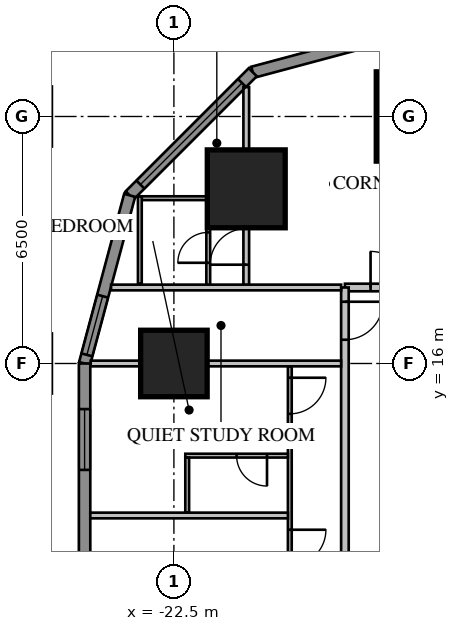
"""IFC4 building model, lengths in metres.
Left out: names, types, materials, properties, quantities, classifications, styles, units other than length and angle.
Written with IfcOpenShell. Run it as: python <this file> out.ifc"""

import sys

from ifc_helpers import new_model, si_unit, direction, frame, frame_2d, origin, origin_2d, place, context, subcontext, project, spatial, rectangle, extrude, element, fill, save


model = new_model("IFC4")
c1 = context("Model", 3, precision=1e-05, world=origin(), true_north=direction((0.0, 1.0)))
c2 = subcontext(c1, "Body", "Model", "MODEL_VIEW")
j1 = project(units=[si_unit("LENGTHUNIT", "METRE"), si_unit("PLANEANGLEUNIT", "RADIAN")], contexts=[c1])
p1 = place(None, origin())
s1 = spatial("IfcSite", under=j1, at=p1, CompositionType="ELEMENT")
p2 = place(p1, origin())
s2 = spatial("IfcBuilding", under=s1, at=p2, CompositionType="ELEMENT")
p3 = place(p2, frame((0.0, 0.0, 27.55)))
s3 = spatial("IfcBuildingStorey", under=s2, at=p3, CompositionType="ELEMENT", Elevation=27.55)
p4 = place(p3, frame((-16.0, 22.5, 0.0), z_axis=(0.0, 0.0, 1.0), x_axis=(1.0, 0.0, 0.0)))
e1 = element("IfcColumn", 1, at=p4, inside=s3, PredefinedType="COLUMN", context=c2, shape_type="SweptSolid", body=[
    extrude(rectangle(XDim=2.35, YDim=2.35, at=origin_2d()), origin(), (0.0, 0.0, 1.0), 3.85),
])
p5 = place(p3, frame((-20.596, 20.596, 0.0), z_axis=(0.0, 0.0, 1.0), x_axis=(1.0, 0.0, 0.0)))
e2 = element("IfcColumn", 2, at=p5, inside=s3, PredefinedType="COLUMN", context=c2, shape_type="SweptSolid", body=[
    extrude(rectangle(XDim=2.05, YDim=2.05, at=origin_2d()), origin(), (0.0, 0.0, 1.0), 3.85),
])
p6 = place(p3, frame((-22.5, 16.0, 0.0), z_axis=(0.0, 0.0, 1.0), x_axis=(1.0, 0.0, 0.0)))
e3 = element("IfcColumn", 3, at=p6, inside=s3, PredefinedType="COLUMN", context=c2, shape_type="SweptSolid", body=[
    extrude(rectangle(XDim=1.75, YDim=1.75, at=origin_2d()), origin(), (0.0, 0.0, 1.0), 3.85),
])
p7 = place(p3, frame((-16.0, 24.85, 0.0), z_axis=(0.0, 0.0, 1.0), x_axis=(-0.965920218567, -0.258839972501, 0.0)))
e4 = element("IfcWall", 4, at=p7, inside=s3, PredefinedType="SOLIDWALL", context=c2, shape_type="SweptSolid", body=[
    extrude(rectangle(XDim=4.581, YDim=0.3, at=frame_2d((2.291, 0.0))), origin(), (0.0, 0.0, 1.0), 3.65),
])
p8 = place(p3, frame((-20.425, 23.664, 0.0), z_axis=(0.0, 0.0, 1.0), x_axis=(-0.707106781187, -0.707106781187, 0.0)))
e5 = element("IfcWall", 5, at=p8, inside=s3, PredefinedType="SOLIDWALL", context=c2, shape_type="SweptSolid", body=[
    extrude(rectangle(XDim=4.581, YDim=0.3, at=frame_2d((2.291, 0.0))), origin(), (0.0, 0.0, 1.0), 3.65),
])
p9 = place(p8, frame((0.4, 0.0, 0.75)))
e6 = element("IfcOpeningElement", 6, at=p9, cuts=e5, PredefinedType="OPENING", context=c2, shape_type="SweptSolid", body=[
    extrude(rectangle(XDim=3.781, YDim=1.8, at=frame_2d((1.891, 0.9))), frame((0.0, 0.17, 0.0), z_axis=(0.0, -1.0, 0.0), x_axis=(1.0, 0.0, 0.0)), (0.0, 0.0, 1.0), 0.34),
])
p10 = place(p3, frame((-23.664, 20.425, 0.0), z_axis=(0.0, 0.0, 1.0), x_axis=(-0.258839972501, -0.965920218567, 0.0)))
e7 = element("IfcWall", 7, at=p10, inside=s3, PredefinedType="SOLIDWALL", context=c2, shape_type="SweptSolid", body=[
    extrude(rectangle(XDim=4.581, YDim=0.3, at=frame_2d((2.291, 0.0))), origin(), (0.0, 0.0, 1.0), 3.65),
])
p11 = place(p10, frame((2.746, 0.0, 0.75)))
e8 = element("IfcOpeningElement", 8, at=p11, cuts=e7, PredefinedType="OPENING", context=c2, shape_type="SweptSolid", body=[
    extrude(rectangle(XDim=1.6, YDim=1.8, at=frame_2d((0.8, 0.9))), frame((0.0, 0.17, 0.0), z_axis=(0.0, -1.0, 0.0), x_axis=(1.0, 0.0, 0.0)), (0.0, 0.0, 1.0), 0.34),
])
p12 = place(p3, frame((-24.85, 16.0, 0.0), z_axis=(0.0, 0.0, 1.0), x_axis=(0.0, -1.0, 0.0)))
e9 = element("IfcWall", 9, at=p12, inside=s3, PredefinedType="SOLIDWALL", context=c2, shape_type="SweptSolid", body=[
    extrude(rectangle(XDim=32.0, YDim=0.3, at=frame_2d((16.0, 0.0))), origin(), (0.0, 0.0, 1.0), 3.65),
])
p13 = place(p12, frame((1.2, 0.0, 0.75)))
e10 = element("IfcOpeningElement", 10, at=p13, cuts=e9, PredefinedType="OPENING", context=c2, shape_type="SweptSolid", body=[
    extrude(rectangle(XDim=1.6, YDim=1.8, at=frame_2d((0.8, 0.9))), frame((0.0, 0.17, 0.0), z_axis=(0.0, -1.0, 0.0), x_axis=(1.0, 0.0, 0.0)), (0.0, 0.0, 1.0), 0.34),
])
p14 = place(p12, frame((5.2, 0.0, 0.75)))
e11 = element("IfcOpeningElement", 11, at=p14, cuts=e9, PredefinedType="OPENING", context=c2, shape_type="SweptSolid", body=[
    extrude(rectangle(XDim=1.6, YDim=1.8, at=frame_2d((0.8, 0.9))), frame((0.0, 0.17, 0.0), z_axis=(0.0, -1.0, 0.0), x_axis=(1.0, 0.0, 0.0)), (0.0, 0.0, 1.0), 0.34),
])
p15 = place(p12, frame((17.2, 0.0, 0.75)))
e12 = element("IfcOpeningElement", 12, at=p15, cuts=e9, PredefinedType="OPENING", context=c2, shape_type="SweptSolid", body=[
    extrude(rectangle(XDim=1.6, YDim=1.8, at=frame_2d((0.8, 0.9))), frame((0.0, 0.17, 0.0), z_axis=(0.0, -1.0, 0.0), x_axis=(1.0, 0.0, 0.0)), (0.0, 0.0, 1.0), 0.34),
])
p16 = place(p12, frame((21.2, 0.0, 0.75)))
e13 = element("IfcOpeningElement", 13, at=p16, cuts=e9, PredefinedType="OPENING", context=c2, shape_type="SweptSolid", body=[
    extrude(rectangle(XDim=1.6, YDim=1.8, at=frame_2d((0.8, 0.9))), frame((0.0, 0.17, 0.0), z_axis=(0.0, -1.0, 0.0), x_axis=(1.0, 0.0, 0.0)), (0.0, 0.0, 1.0), 0.34),
])
p17 = place(p12, frame((25.2, 0.0, 0.75)))
e14 = element("IfcOpeningElement", 14, at=p17, cuts=e9, PredefinedType="OPENING", context=c2, shape_type="SweptSolid", body=[
    extrude(rectangle(XDim=1.6, YDim=1.8, at=frame_2d((0.8, 0.9))), frame((0.0, 0.17, 0.0), z_axis=(0.0, -1.0, 0.0), x_axis=(1.0, 0.0, 0.0)), (0.0, 0.0, 1.0), 0.34),
])
p18 = place(p12, frame((29.2, 0.0, 0.75)))
e15 = element("IfcOpeningElement", 15, at=p18, cuts=e9, PredefinedType="OPENING", context=c2, shape_type="SweptSolid", body=[
    extrude(rectangle(XDim=1.6, YDim=1.8, at=frame_2d((0.8, 0.9))), frame((0.0, 0.17, 0.0), z_axis=(0.0, -1.0, 0.0), x_axis=(1.0, 0.0, 0.0)), (0.0, 0.0, 1.0), 0.34),
])
p19 = place(p12, frame((8.8, 0.0, 0.75)))
e16 = element("IfcOpeningElement", 16, at=p19, cuts=e9, PredefinedType="OPENING", context=c2, shape_type="SweptSolid", body=[
    extrude(rectangle(XDim=2.4, YDim=1.8, at=frame_2d((1.2, 0.9))), frame((0.0, 0.17, 0.0), z_axis=(0.0, -1.0, 0.0), x_axis=(1.0, 0.0, 0.0)), (0.0, 0.0, 1.0), 0.34),
])
p20 = place(p12, frame((13.812, 0.0, 0.0)))
e17 = element("IfcOpeningElement", 17, at=p20, cuts=e9, PredefinedType="OPENING", context=c2, shape_type="SweptSolid", body=[
    extrude(rectangle(XDim=1.0, YDim=2.4, at=frame_2d((0.5, 1.2))), frame((0.0, 0.17, 0.0), z_axis=(0.0, -1.0, 0.0), x_axis=(1.0, 0.0, 0.0)), (0.0, 0.0, 1.0), 0.34),
])
p21 = place(p3, frame((18.0, 18.0, 0.0), z_axis=(0.0, 0.0, 1.0), x_axis=(-1.0, 0.0, 0.0)))
e18 = element("IfcWall", 18, at=p21, inside=s3, PredefinedType="PARTITIONING", context=c2, shape_type="SweptSolid", body=[
    extrude(rectangle(XDim=36.0, YDim=0.2, at=frame_2d((18.0, 0.0))), origin(), (0.0, 0.0, 1.0), 3.65),
])
p22 = place(p21, frame((0.375, 0.0, 0.0)))
e19 = element("IfcOpeningElement", 19, at=p22, cuts=e18, PredefinedType="OPENING", context=c2, shape_type="SweptSolid", body=[
    extrude(rectangle(XDim=1.0, YDim=2.1, at=frame_2d((0.5, 1.05))), frame((0.0, 0.12, 0.0), z_axis=(0.0, -1.0, 0.0), x_axis=(1.0, 0.0, 0.0)), (0.0, 0.0, 1.0), 0.24),
])
p23 = place(p21, frame((3.8, 0.0, 0.0)))
e20 = element("IfcOpeningElement", 20, at=p23, cuts=e18, PredefinedType="OPENING", context=c2, shape_type="SweptSolid", body=[
    extrude(rectangle(XDim=0.95, YDim=2.1, at=frame_2d((0.475, 1.05))), frame((0.0, 0.12, 0.0), z_axis=(0.0, -1.0, 0.0), x_axis=(1.0, 0.0, 0.0)), (0.0, 0.0, 1.0), 0.24),
])
p24 = place(p21, frame((7.8, 0.0, 0.0)))
e21 = element("IfcOpeningElement", 21, at=p24, cuts=e18, PredefinedType="OPENING", context=c2, shape_type="SweptSolid", body=[
    extrude(rectangle(XDim=0.95, YDim=2.1, at=frame_2d((0.475, 1.05))), frame((0.0, 0.12, 0.0), z_axis=(0.0, -1.0, 0.0), x_axis=(1.0, 0.0, 0.0)), (0.0, 0.0, 1.0), 0.24),
])
p25 = place(p21, frame((19.8, 0.0, 0.0)))
e22 = element("IfcOpeningElement", 22, at=p25, cuts=e18, PredefinedType="OPENING", context=c2, shape_type="SweptSolid", body=[
    extrude(rectangle(XDim=0.95, YDim=2.1, at=frame_2d((0.475, 1.05))), frame((0.0, 0.12, 0.0), z_axis=(0.0, -1.0, 0.0), x_axis=(1.0, 0.0, 0.0)), (0.0, 0.0, 1.0), 0.24),
])
p26 = place(p21, frame((23.8, 0.0, 0.0)))
e23 = element("IfcOpeningElement", 23, at=p26, cuts=e18, PredefinedType="OPENING", context=c2, shape_type="SweptSolid", body=[
    extrude(rectangle(XDim=0.95, YDim=2.1, at=frame_2d((0.475, 1.05))), frame((0.0, 0.12, 0.0), z_axis=(0.0, -1.0, 0.0), x_axis=(1.0, 0.0, 0.0)), (0.0, 0.0, 1.0), 0.24),
])
p27 = place(p21, frame((27.8, 0.0, 0.0)))
e24 = element("IfcOpeningElement", 24, at=p27, cuts=e18, PredefinedType="OPENING", context=c2, shape_type="SweptSolid", body=[
    extrude(rectangle(XDim=0.95, YDim=2.1, at=frame_2d((0.475, 1.05))), frame((0.0, 0.12, 0.0), z_axis=(0.0, -1.0, 0.0), x_axis=(1.0, 0.0, 0.0)), (0.0, 0.0, 1.0), 0.24),
])
p28 = place(p21, frame((31.8, 0.0, 0.0)))
e25 = element("IfcOpeningElement", 25, at=p28, cuts=e18, PredefinedType="OPENING", context=c2, shape_type="SweptSolid", body=[
    extrude(rectangle(XDim=0.95, YDim=2.1, at=frame_2d((0.475, 1.05))), frame((0.0, 0.12, 0.0), z_axis=(0.0, -1.0, 0.0), x_axis=(1.0, 0.0, 0.0)), (0.0, 0.0, 1.0), 0.24),
])
p29 = place(p21, frame((34.375, 0.0, 0.0)))
e26 = element("IfcOpeningElement", 26, at=p29, cuts=e18, PredefinedType="OPENING", context=c2, shape_type="SweptSolid", body=[
    extrude(rectangle(XDim=0.95, YDim=2.1, at=frame_2d((0.475, 1.05))), frame((0.0, 0.12, 0.0), z_axis=(0.0, -1.0, 0.0), x_axis=(1.0, 0.0, 0.0)), (0.0, 0.0, 1.0), 0.24),
])
p30 = place(p21, frame((11.2, 0.0, 0.0)))
e27 = element("IfcOpeningElement", 27, at=p30, cuts=e18, PredefinedType="OPENING", context=c2, shape_type="SweptSolid", body=[
    extrude(rectangle(XDim=1.0, YDim=2.1, at=frame_2d((0.5, 1.05))), frame((0.0, 0.12, 0.0), z_axis=(0.0, -1.0, 0.0), x_axis=(1.0, 0.0, 0.0)), (0.0, 0.0, 1.0), 0.24),
])
p31 = place(p3, frame((-21.596, 18.065, 0.0), z_axis=(0.0, 0.0, 1.0), x_axis=(0.0, 1.0, 0.0)))
e28 = element("IfcWall", 28, at=p31, inside=s3, PredefinedType="PARTITIONING", context=c2, shape_type="SweptSolid", body=[
    extrude(rectangle(XDim=2.335, YDim=0.1, at=frame_2d((1.167, 0.0))), origin(), (0.0, 0.0, 1.0), 3.65),
])
p32 = place(p31, frame((0.585, 0.0, 0.0)))
e29 = element("IfcOpeningElement", 29, at=p32, cuts=e28, PredefinedType="OPENING", context=c2, shape_type="SweptSolid", body=[
    extrude(rectangle(XDim=0.8, YDim=2.1, at=frame_2d((0.4, 1.05))), frame((0.0, 0.07, 0.0), z_axis=(0.0, -1.0, 0.0), x_axis=(1.0, 0.0, 0.0)), (0.0, 0.0, 1.0), 0.14),
])
p33 = place(p3, frame((-21.646, 20.35, 0.0), z_axis=(0.0, 0.0, 1.0), x_axis=(-1.0, 0.0, 0.0)))
e30 = element("IfcWall", 30, at=p33, inside=s3, PredefinedType="PARTITIONING", context=c2, shape_type="SweptSolid", body=[
    extrude(rectangle(XDim=1.7, YDim=0.1, at=frame_2d((0.85, 0.0))), origin(), (0.0, 0.0, 1.0), 3.65),
])
p34 = place(p3, frame((-23.396, 18.1, 0.0), z_axis=(0.0, 0.0, 1.0), x_axis=(0.0, 1.0, 0.0)))
e31 = element("IfcWall", 31, at=p34, inside=s3, PredefinedType="PARTITIONING", context=c2, shape_type="SweptSolid", body=[
    extrude(rectangle(XDim=2.3, YDim=0.1, at=frame_2d((1.15, 0.0))), origin(), (0.0, 0.0, 1.0), 3.65),
])
p35 = place(p3, frame((-20.596, 18.065, 0.0), z_axis=(0.0, 0.0, 1.0), x_axis=(0.0, 1.0, 0.0)))
e32 = element("IfcWall", 32, at=p35, inside=s3, PredefinedType="PARTITIONING", context=c2, shape_type="SweptSolid", body=[
    extrude(rectangle(XDim=5.209, YDim=0.15, at=frame_2d((2.604, 0.0))), origin(), (0.0, 0.0, 1.0), 3.65),
])
p36 = place(p35, frame((0.535, 0.0, 0.0)))
e33 = element("IfcOpeningElement", 33, at=p36, cuts=e32, PredefinedType="OPENING", context=c2, shape_type="SweptSolid", body=[
    extrude(rectangle(XDim=0.95, YDim=2.1, at=frame_2d((0.475, 1.05))), frame((0.0, 0.095, 0.0), z_axis=(0.0, -1.0, 0.0), x_axis=(1.0, 0.0, 0.0)), (0.0, 0.0, 1.0), 0.19),
])
p37 = place(p3, frame((-18.0, 18.0, 0.0), z_axis=(0.0, 0.0, 1.0), x_axis=(0.0, -1.0, 0.0)))
e34 = element("IfcWall", 34, at=p37, inside=s3, PredefinedType="PARTITIONING", context=c2, shape_type="SweptSolid", body=[
    extrude(rectangle(XDim=36.0, YDim=0.2, at=frame_2d((18.0, 0.0))), origin(), (0.0, 0.0, 1.0), 3.65),
])
p38 = place(p37, frame((10.4, 0.0, 0.0)))
e35 = element("IfcOpeningElement", 35, at=p38, cuts=e34, PredefinedType="OPENING", context=c2, shape_type="SweptSolid", body=[
    extrude(rectangle(XDim=1.0, YDim=2.1, at=frame_2d((0.5, 1.05))), frame((0.0, 0.12, 0.0), z_axis=(0.0, -1.0, 0.0), x_axis=(1.0, 0.0, 0.0)), (0.0, 0.0, 1.0), 0.24),
])
p39 = place(p37, frame((14.4, 0.0, 0.0)))
e36 = element("IfcOpeningElement", 36, at=p39, cuts=e34, PredefinedType="OPENING", context=c2, shape_type="SweptSolid", body=[
    extrude(rectangle(XDim=1.0, YDim=2.1, at=frame_2d((0.5, 1.05))), frame((0.0, 0.12, 0.0), z_axis=(0.0, -1.0, 0.0), x_axis=(1.0, 0.0, 0.0)), (0.0, 0.0, 1.0), 0.24),
])
p40 = place(p37, frame((0.375, 0.0, 0.0)))
e37 = element("IfcOpeningElement", 37, at=p40, cuts=e34, PredefinedType="OPENING", context=c2, shape_type="SweptSolid", body=[
    extrude(rectangle(XDim=1.0, YDim=2.1, at=frame_2d((0.5, 1.05))), frame((0.0, 0.12, 0.0), z_axis=(0.0, -1.0, 0.0), x_axis=(1.0, 0.0, 0.0)), (0.0, 0.0, 1.0), 0.24),
])
p41 = place(p37, frame((34.375, 0.0, 0.0)))
e38 = element("IfcOpeningElement", 38, at=p41, cuts=e34, PredefinedType="OPENING", context=c2, shape_type="SweptSolid", body=[
    extrude(rectangle(XDim=0.95, YDim=2.1, at=frame_2d((0.475, 1.05))), frame((0.0, 0.12, 0.0), z_axis=(0.0, -1.0, 0.0), x_axis=(1.0, 0.0, 0.0)), (0.0, 0.0, 1.0), 0.24),
])
p42 = place(p3, frame((-19.45, 15.925, 0.0), z_axis=(0.0, 0.0, 1.0), x_axis=(0.0, -1.0, 0.0)))
e39 = element("IfcWall", 39, at=p42, inside=s3, PredefinedType="PARTITIONING", context=c2, shape_type="SweptSolid", body=[
    extrude(rectangle(XDim=11.85, YDim=0.1, at=frame_2d((5.925, 0.0))), origin(), (0.0, 0.0, 1.0), 3.65),
])
p43 = place(p42, frame((10.125, 0.0, 0.0)))
e40 = element("IfcOpeningElement", 40, at=p43, cuts=e39, PredefinedType="OPENING", context=c2, shape_type="SweptSolid", body=[
    extrude(rectangle(XDim=1.0, YDim=2.1, at=frame_2d((0.5, 1.05))), frame((0.0, 0.07, 0.0), z_axis=(0.0, -1.0, 0.0), x_axis=(1.0, 0.0, 0.0)), (0.0, 0.0, 1.0), 0.14),
])
p44 = place(p42, frame((8.3, 0.0, 0.0)))
e41 = element("IfcOpeningElement", 41, at=p44, cuts=e39, PredefinedType="OPENING", context=c2, shape_type="SweptSolid", body=[
    extrude(rectangle(XDim=0.8, YDim=2.1, at=frame_2d((0.4, 1.05))), frame((0.0, 0.07, 0.0), z_axis=(0.0, -1.0, 0.0), x_axis=(1.0, 0.0, 0.0)), (0.0, 0.0, 1.0), 0.14),
])
p45 = place(p42, frame((0.3, 0.0, 0.0)))
e42 = element("IfcOpeningElement", 42, at=p45, cuts=e39, PredefinedType="OPENING", context=c2, shape_type="SweptSolid", body=[
    extrude(rectangle(XDim=0.95, YDim=2.1, at=frame_2d((0.475, 1.05))), frame((0.0, 0.07, 0.0), z_axis=(0.0, -1.0, 0.0), x_axis=(1.0, 0.0, 0.0)), (0.0, 0.0, 1.0), 0.14),
])
p46 = place(p42, frame((4.3, 0.0, 0.0)))
e43 = element("IfcOpeningElement", 43, at=p46, cuts=e39, PredefinedType="OPENING", context=c2, shape_type="SweptSolid", body=[
    extrude(rectangle(XDim=0.95, YDim=2.1, at=frame_2d((0.475, 1.05))), frame((0.0, 0.07, 0.0), z_axis=(0.0, -1.0, 0.0), x_axis=(1.0, 0.0, 0.0)), (0.0, 0.0, 1.0), 0.14),
])
p47 = place(p3, frame((-18.1, 18.0, 0.0), z_axis=(0.0, 0.0, 1.0), x_axis=(-1.0, 0.0, 0.0)))
e44 = element("IfcWall", 44, at=p47, inside=s3, PredefinedType="PARTITIONING", context=c2, shape_type="SweptSolid", body=[
    extrude(rectangle(XDim=6.053, YDim=0.15, at=frame_2d((3.027, 0.0))), origin(), (0.0, 0.0, 1.0), 3.65),
])
p48 = place(p3, frame((-18.1, 16.0, 0.0), z_axis=(0.0, 0.0, 1.0), x_axis=(-1.0, 0.0, 0.0)))
e45 = element("IfcWall", 45, at=p48, inside=s3, PredefinedType="PARTITIONING", context=c2, shape_type="SweptSolid", body=[
    extrude(rectangle(XDim=6.589, YDim=0.15, at=frame_2d((3.295, 0.0))), origin(), (0.0, 0.0, 1.0), 3.65),
])
p49 = place(p3, frame((-19.5, 12.0, 0.0), z_axis=(0.0, 0.0, 1.0), x_axis=(-1.0, 0.0, 0.0)))
e46 = element("IfcWall", 46, at=p49, inside=s3, PredefinedType="PARTITIONING", context=c2, shape_type="SweptSolid", body=[
    extrude(rectangle(XDim=5.2, YDim=0.15, at=frame_2d((2.6, 0.0))), origin(), (0.0, 0.0, 1.0), 3.65),
])
p50 = place(p3, frame((-19.5, 13.575, 0.0), z_axis=(0.0, 0.0, 1.0), x_axis=(-1.0, 0.0, 0.0)))
e47 = element("IfcWall", 47, at=p50, inside=s3, PredefinedType="PARTITIONING", context=c2, shape_type="SweptSolid", body=[
    extrude(rectangle(XDim=2.7, YDim=0.1, at=frame_2d((1.35, 0.0))), origin(), (0.0, 0.0, 1.0), 3.65),
])
p51 = place(p50, frame((0.55, 0.0, 0.0)))
e48 = element("IfcOpeningElement", 48, at=p51, cuts=e47, PredefinedType="OPENING", context=c2, shape_type="SweptSolid", body=[
    extrude(rectangle(XDim=0.8, YDim=2.1, at=frame_2d((0.4, 1.05))), frame((0.0, 0.07, 0.0), z_axis=(0.0, -1.0, 0.0), x_axis=(1.0, 0.0, 0.0)), (0.0, 0.0, 1.0), 0.14),
])
p52 = place(p3, frame((-22.15, 13.525, 0.0), z_axis=(0.0, 0.0, 1.0), x_axis=(0.0, -1.0, 0.0)))
e49 = element("IfcWall", 49, at=p52, inside=s3, PredefinedType="PARTITIONING", context=c2, shape_type="SweptSolid", body=[
    extrude(rectangle(XDim=1.45, YDim=0.1, at=frame_2d((0.725, 0.0))), origin(), (0.0, 0.0, 1.0), 3.65),
])
p53 = place(p9, origin())
e50 = element("IfcWindow", 50, at=p53, inside=s3, PartitioningType="SINGLE_PANEL", PredefinedType="WINDOW", context=c2, shape_type="SweptSolid", body=[
    extrude(rectangle(XDim=3.781, YDim=1.8, at=frame_2d((1.891, 0.9))), frame((0.0, 0.03, 0.0), z_axis=(0.0, -1.0, 0.0), x_axis=(1.0, 0.0, 0.0)), (0.0, 0.0, 1.0), 0.06),
])
fill(e6, e50)
p54 = place(p11, origin())
e51 = element("IfcWindow", 51, at=p54, inside=s3, PartitioningType="SINGLE_PANEL", PredefinedType="WINDOW", context=c2, shape_type="SweptSolid", body=[
    extrude(rectangle(XDim=1.6, YDim=1.8, at=frame_2d((0.8, 0.9))), frame((0.0, 0.03, 0.0), z_axis=(0.0, -1.0, 0.0), x_axis=(1.0, 0.0, 0.0)), (0.0, 0.0, 1.0), 0.06),
])
fill(e8, e51)
p55 = place(p13, origin())
e52 = element("IfcWindow", 52, at=p55, inside=s3, PartitioningType="SINGLE_PANEL", PredefinedType="WINDOW", context=c2, shape_type="SweptSolid", body=[
    extrude(rectangle(XDim=1.6, YDim=1.8, at=frame_2d((0.8, 0.9))), frame((0.0, 0.03, 0.0), z_axis=(0.0, -1.0, 0.0), x_axis=(1.0, 0.0, 0.0)), (0.0, 0.0, 1.0), 0.06),
])
fill(e10, e52)
p56 = place(p29, origin())
e53 = element("IfcDoor", 53, at=p56, inside=s3, OperationType="SINGLE_SWING_RIGHT", PredefinedType="DOOR", context=c2, shape_type="SweptSolid", body=[
    extrude(rectangle(XDim=0.95, YDim=2.1, at=frame_2d((0.475, 1.05))), frame((0.0, 0.025, 0.0), z_axis=(0.0, -1.0, 0.0), x_axis=(1.0, 0.0, 0.0)), (0.0, 0.0, 1.0), 0.05),
])
fill(e26, e53)
p57 = place(p32, origin())
e54 = element("IfcDoor", 54, at=p57, inside=s3, OperationType="SINGLE_SWING_LEFT", PredefinedType="DOOR", context=c2, shape_type="SweptSolid", body=[
    extrude(rectangle(XDim=0.8, YDim=2.1, at=frame_2d((0.4, 1.05))), frame((0.0, 0.025, 0.0), z_axis=(0.0, -1.0, 0.0), x_axis=(1.0, 0.0, 0.0)), (0.0, 0.0, 1.0), 0.05),
])
fill(e29, e54)
p58 = place(p36, origin())
e55 = element("IfcDoor", 55, at=p58, inside=s3, OperationType="SINGLE_SWING_LEFT", PredefinedType="DOOR", context=c2, shape_type="SweptSolid", body=[
    extrude(rectangle(XDim=0.95, YDim=2.1, at=frame_2d((0.475, 1.05))), frame((0.0, 0.025, 0.0), z_axis=(0.0, -1.0, 0.0), x_axis=(1.0, 0.0, 0.0)), (0.0, 0.0, 1.0), 0.05),
])
fill(e33, e55)
p59 = place(p40, origin())
e56 = element("IfcDoor", 56, at=p59, inside=s3, OperationType="SINGLE_SWING_LEFT", PredefinedType="DOOR", context=c2, shape_type="SweptSolid", body=[
    extrude(rectangle(XDim=1.0, YDim=2.1, at=frame_2d((0.5, 1.05))), frame((0.0, 0.025, 0.0), z_axis=(0.0, -1.0, 0.0), x_axis=(1.0, 0.0, 0.0)), (0.0, 0.0, 1.0), 0.05),
])
fill(e37, e56)
p60 = place(p45, origin())
e57 = element("IfcDoor", 57, at=p60, inside=s3, OperationType="SINGLE_SWING_LEFT", PredefinedType="DOOR", context=c2, shape_type="SweptSolid", body=[
    extrude(rectangle(XDim=0.95, YDim=2.1, at=frame_2d((0.475, 1.05))), frame((0.0, 0.025, 0.0), z_axis=(0.0, -1.0, 0.0), x_axis=(1.0, 0.0, 0.0)), (0.0, 0.0, 1.0), 0.05),
])
fill(e42, e57)
p61 = place(p51, origin())
e58 = element("IfcDoor", 58, at=p61, inside=s3, OperationType="SINGLE_SWING_LEFT", PredefinedType="DOOR", context=c2, shape_type="SweptSolid", body=[
    extrude(rectangle(XDim=0.8, YDim=2.1, at=frame_2d((0.4, 1.05))), frame((0.0, 0.025, 0.0), z_axis=(0.0, -1.0, 0.0), x_axis=(1.0, 0.0, 0.0)), (0.0, 0.0, 1.0), 0.05),
])
fill(e48, e58)
p62 = place(p46, origin())
e59 = element("IfcDoor", 59, at=p62, inside=s3, OperationType="SINGLE_SWING_LEFT", PredefinedType="DOOR", context=c2, shape_type="SweptSolid", body=[
    extrude(rectangle(XDim=0.95, YDim=2.1, at=frame_2d((0.475, 1.05))), frame((0.0, 0.025, 0.0), z_axis=(0.0, -1.0, 0.0), x_axis=(1.0, 0.0, 0.0)), (0.0, 0.0, 1.0), 0.05),
])
fill(e43, e59)
save(model, sys.argv[1])
